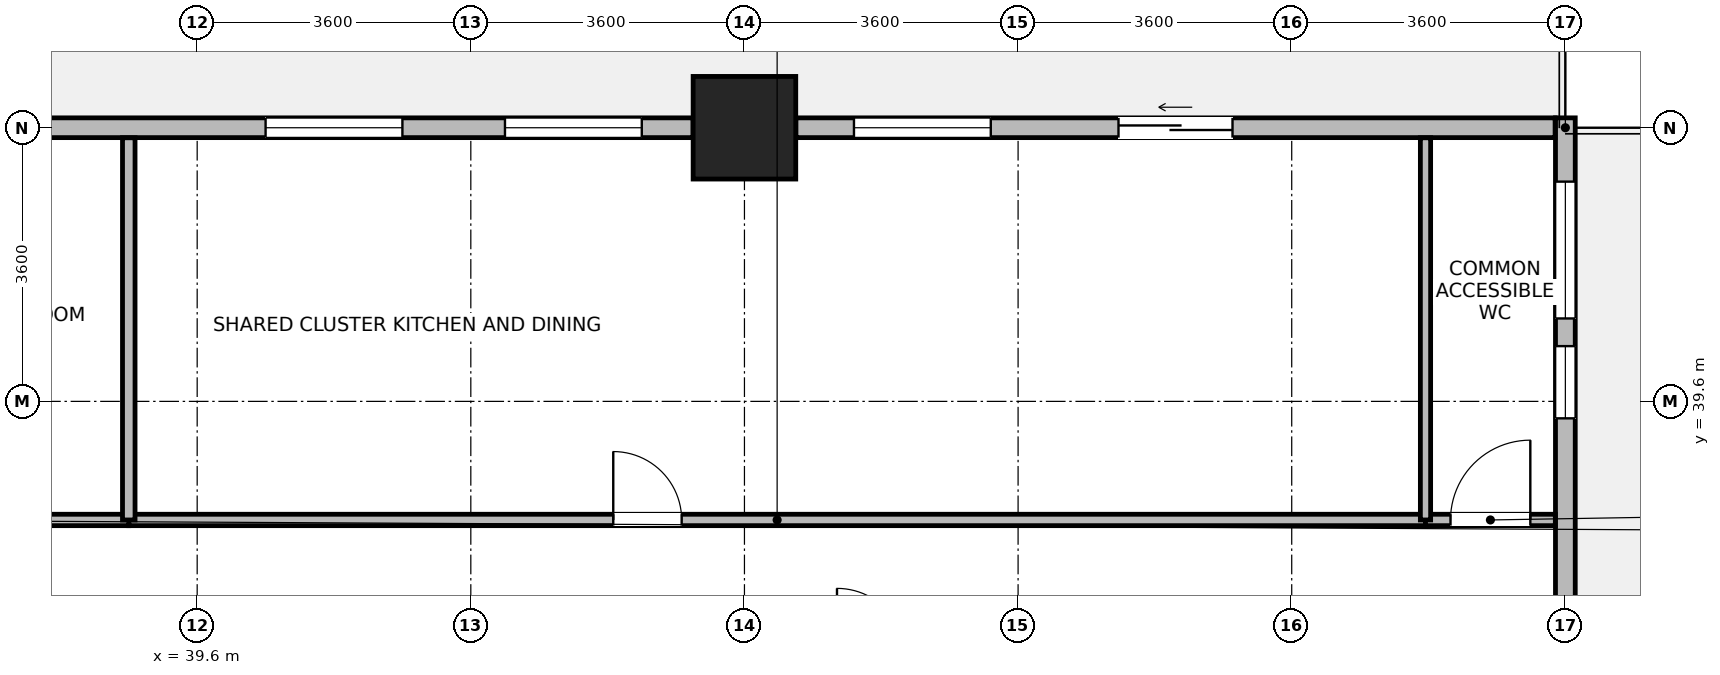
"""IFC4 building model, lengths in metres.
Left out: names, types, materials, properties, quantities, classifications, styles, units other than length and angle.
Written with IfcOpenShell. Run it as: python <this file> out.ifc"""

import sys

from ifc_helpers import new_model, si_unit, direction, frame, frame_2d, origin, origin_2d, place, context, subcontext, project, spatial, rectangle, extrude, source, transform, mapped, element, fill, save


model = new_model("IFC4")
c1 = context("Model", 3, precision=1e-05, world=origin(), true_north=direction((0.0, 1.0)))
c2 = subcontext(c1, "Body", "Model", "MODEL_VIEW")
j1 = project(units=[si_unit("LENGTHUNIT", "METRE"), si_unit("PLANEANGLEUNIT", "RADIAN")], contexts=[c1])
p1 = place(None, origin())
s1 = spatial("IfcSite", under=j1, at=p1, CompositionType="ELEMENT")
p2 = place(p1, origin())
s2 = spatial("IfcBuilding", under=s1, at=p2, CompositionType="ELEMENT")
p3 = place(p2, frame((0.0, 0.0, 32.7)))
s3 = spatial("IfcBuildingStorey", under=s2, at=p3, CompositionType="ELEMENT", Elevation=32.7)
m1 = source(origin(), c2, "Body", "SweptSolid", [
    extrude(rectangle(XDim=1.35, YDim=1.35, at=origin_2d()), origin(), (0.0, 0.0, 1.0), 3.7),
])
p4 = place(p3, frame((46.8, 43.2, 0.0), z_axis=(0.0, 0.0, 1.0), x_axis=(1.0, 0.0, 0.0)))
e1 = element("IfcColumn", 1, at=p4, inside=s3, PredefinedType="COLUMN", context=c2, shape_type="MappedRepresentation", body=[
    mapped(m1, transform((0.0, 0.0, 0.0), x_axis=(1.0, 0.0, 0.0), y_axis=(0.0, 1.0, 0.0), z_axis=(0.0, 0.0, 1.0), scale=1.0)),
])
p5 = place(p3, frame((57.6, 43.33, 0.0), z_axis=(0.0, 0.0, 1.0), x_axis=(0.0, -1.0, 0.0)))
e2 = element("IfcWall", 2, at=p5, inside=s3, PredefinedType="STANDARD", context=c2, shape_type="SweptSolid", body=[
    extrude(rectangle(XDim=6.956, YDim=0.26, at=frame_2d((3.478, 0.0))), origin(), (0.0, 0.0, 1.0), 3.43),
])
p6 = place(p5, frame((0.839, 0.0, 0.85)))
e3 = element("IfcOpeningElement", 3, at=p6, cuts=e2, PredefinedType="OPENING", context=c2, shape_type="SweptSolid", body=[
    extrude(rectangle(XDim=1.8, YDim=1.85, at=frame_2d((0.9, 0.925))), frame((0.0, 0.14, 0.0), z_axis=(0.0, -1.0, 0.0), x_axis=(1.0, 0.0, 0.0)), (0.0, 0.0, 1.0), 0.28),
])
p7 = place(p5, frame((3.003, 0.0, 0.85)))
e4 = element("IfcOpeningElement", 4, at=p7, cuts=e2, PredefinedType="OPENING", context=c2, shape_type="SweptSolid", body=[
    extrude(rectangle(XDim=0.95, YDim=1.75, at=frame_2d((0.475, 0.875))), frame((0.0, 0.14, 0.0), z_axis=(0.0, -1.0, 0.0), x_axis=(1.0, 0.0, 0.0)), (0.0, 0.0, 1.0), 0.28),
])
p8 = place(p3, frame((47.476, 43.2, 0.0), z_axis=(0.0, 0.0, 1.0), x_axis=(1.0, 0.0, 0.0)))
e5 = element("IfcWall", 5, at=p8, inside=s3, PredefinedType="STANDARD", context=c2, shape_type="SweptSolid", body=[
    extrude(rectangle(XDim=9.989, YDim=0.26, at=frame_2d((4.995, 0.0))), origin(), (0.0, 0.0, 1.0), 3.43),
])
p9 = place(p8, frame((4.245, 0.0, 0.0)))
e6 = element("IfcOpeningElement", 6, at=p9, cuts=e5, PredefinedType="OPENING", context=c2, shape_type="SweptSolid", body=[
    extrude(rectangle(XDim=1.5, YDim=2.15, at=frame_2d((0.75, 1.075))), frame((0.0, 0.14, 0.0), z_axis=(0.0, -1.0, 0.0), x_axis=(1.0, 0.0, 0.0)), (0.0, 0.0, 1.0), 0.28),
])
p10 = place(p8, frame((0.765, 0.0, 0.85)))
e7 = element("IfcOpeningElement", 7, at=p10, cuts=e5, PredefinedType="OPENING", context=c2, shape_type="SweptSolid", body=[
    extrude(rectangle(XDim=1.8, YDim=1.85, at=frame_2d((0.9, 0.925))), frame((0.0, 0.14, 0.0), z_axis=(0.0, -1.0, 0.0), x_axis=(1.0, 0.0, 0.0)), (0.0, 0.0, 1.0), 0.28),
])
p11 = place(p3, frame((36.676, 43.2, 0.0), z_axis=(0.0, 0.0, 1.0), x_axis=(1.0, 0.0, 0.0)))
e8 = element("IfcWall", 8, at=p11, inside=s3, PredefinedType="STANDARD", context=c2, shape_type="SweptSolid", body=[
    extrude(rectangle(XDim=9.448, YDim=0.26, at=frame_2d((4.724, 0.0))), origin(), (0.0, 0.0, 1.0), 2.93),
])
p12 = place(p11, frame((3.824, 0.0, 0.85)))
e9 = element("IfcOpeningElement", 9, at=p12, cuts=e8, PredefinedType="OPENING", context=c2, shape_type="SweptSolid", body=[
    extrude(rectangle(XDim=1.8, YDim=1.85, at=frame_2d((0.9, 0.925))), frame((0.0, 0.14, 0.0), z_axis=(0.0, -1.0, 0.0), x_axis=(1.0, 0.0, 0.0)), (0.0, 0.0, 1.0), 0.28),
])
p13 = place(p11, frame((6.973, 0.0, 0.85)))
e10 = element("IfcOpeningElement", 10, at=p13, cuts=e8, PredefinedType="OPENING", context=c2, shape_type="SweptSolid", body=[
    extrude(rectangle(XDim=1.8, YDim=1.85, at=frame_2d((0.9, 0.925))), frame((0.0, 0.14, 0.0), z_axis=(0.0, -1.0, 0.0), x_axis=(1.0, 0.0, 0.0)), (0.0, 0.0, 1.0), 0.28),
])
p14 = place(p3, frame((38.7, 38.04, 0.0), z_axis=(0.0, 0.0, 1.0), x_axis=(1.0, 0.0, 0.0)))
e11 = element("IfcWall", 11, at=p14, inside=s3, PredefinedType="PARTITIONING", context=c2, shape_type="SweptSolid", body=[
    extrude(rectangle(XDim=17.06, YDim=0.15, at=frame_2d((8.53, 0.0))), origin(), (0.0, 0.0, 1.0), 3.43),
])
p15 = place(p14, frame((6.374, 0.0, 0.0)))
e12 = element("IfcOpeningElement", 12, at=p15, cuts=e11, PredefinedType="OPENING", context=c2, shape_type="SweptSolid", body=[
    extrude(rectangle(XDim=0.9, YDim=2.08, at=frame_2d((0.45, 1.04))), frame((0.0, 0.085, 0.0), z_axis=(0.0, -1.0, 0.0), x_axis=(1.0, 0.0, 0.0)), (0.0, 0.0, 1.0), 0.17),
])
p16 = place(p3, frame((29.72, 38.04, 0.0), z_axis=(0.0, 0.0, 1.0), x_axis=(1.0, 0.0, 0.0)))
e13 = element("IfcWall", 13, at=p16, inside=s3, PredefinedType="PARTITIONING", context=c2, shape_type="SweptSolid", body=[
    extrude(rectangle(XDim=8.98, YDim=0.15, at=frame_2d((4.49, 0.0))), origin(), (0.0, 0.0, 1.0), 3.43),
])
p17 = place(p16, frame((4.015, 0.0, 0.0)))
e14 = element("IfcOpeningElement", 14, at=p17, cuts=e13, PredefinedType="OPENING", context=c2, shape_type="SweptSolid", body=[
    extrude(rectangle(XDim=0.95, YDim=2.1, at=frame_2d((0.475, 1.05))), frame((0.0, 0.085, 0.0), z_axis=(0.0, -1.0, 0.0), x_axis=(1.0, 0.0, 0.0)), (0.0, 0.0, 1.0), 0.17),
])
p18 = place(p3, frame((55.76, 38.04, 0.0), z_axis=(0.0, 0.0, 1.0), x_axis=(1.0, 0.0, 0.0)))
e15 = element("IfcWall", 15, at=p18, inside=s3, PredefinedType="PARTITIONING", context=c2, shape_type="SweptSolid", body=[
    extrude(rectangle(XDim=1.708, YDim=0.15, at=frame_2d((0.854, 0.0))), origin(), (0.0, 0.0, 1.0), 3.43),
])
p19 = place(p18, frame((0.329, 0.0, 0.0)))
e16 = element("IfcOpeningElement", 16, at=p19, cuts=e15, PredefinedType="OPENING", context=c2, shape_type="SweptSolid", body=[
    extrude(rectangle(XDim=1.05, YDim=2.12, at=frame_2d((0.525, 1.06))), frame((0.0, 0.085, 0.0), z_axis=(0.0, -1.0, 0.0), x_axis=(1.0, 0.0, 0.0)), (0.0, 0.0, 1.0), 0.17),
])
p20 = place(p3, frame((38.7, 38.04, 0.0), z_axis=(0.0, 0.0, 1.0), x_axis=(0.0, 1.0, 0.0)))
e17 = element("IfcWall", 17, at=p20, inside=s3, PredefinedType="PARTITIONING", context=c2, shape_type="SweptSolid", body=[
    extrude(rectangle(XDim=5.028, YDim=0.165, at=frame_2d((2.514, 0.0))), origin(), (0.0, 0.0, 1.0), 3.43),
])
p21 = place(p3, frame((55.76, 38.04, 0.0), z_axis=(0.0, 0.0, 1.0), x_axis=(0.0, 1.0, 0.0)))
e18 = element("IfcWall", 18, at=p21, inside=s3, PredefinedType="PARTITIONING", context=c2, shape_type="SweptSolid", body=[
    extrude(rectangle(XDim=5.028, YDim=0.135, at=frame_2d((2.514, 0.0))), origin(), (0.0, 0.0, 1.0), 3.43),
])
p22 = place(p6, origin())
e19 = element("IfcWindow", 19, at=p22, inside=s3, PartitioningType="SINGLE_PANEL", PredefinedType="WINDOW", context=c2, shape_type="SweptSolid", body=[
    extrude(rectangle(XDim=1.8, YDim=1.85, at=frame_2d((0.9, 0.925))), frame((0.0, 0.03, 0.0), z_axis=(0.0, -1.0, 0.0), x_axis=(1.0, 0.0, 0.0)), (0.0, 0.0, 1.0), 0.06),
])
fill(e3, e19)
p23 = place(p7, origin())
e20 = element("IfcWindow", 20, at=p23, inside=s3, PartitioningType="SINGLE_PANEL", PredefinedType="WINDOW", context=c2, shape_type="SweptSolid", body=[
    extrude(rectangle(XDim=0.95, YDim=1.75, at=frame_2d((0.475, 0.875))), frame((0.0, 0.03, 0.0), z_axis=(0.0, -1.0, 0.0), x_axis=(1.0, 0.0, 0.0)), (0.0, 0.0, 1.0), 0.06),
])
fill(e4, e20)
p24 = place(p9, origin())
e21 = element("IfcDoor", 21, at=p24, inside=s3, OperationType="SLIDING_TO_LEFT", PredefinedType="DOOR", context=c2, shape_type="SweptSolid", body=[
    extrude(rectangle(XDim=1.5, YDim=2.15, at=frame_2d((0.75, 1.075))), frame((0.0, 0.025, 0.0), z_axis=(0.0, -1.0, 0.0), x_axis=(1.0, 0.0, 0.0)), (0.0, 0.0, 1.0), 0.05),
])
fill(e6, e21)
p25 = place(p10, origin())
e22 = element("IfcWindow", 22, at=p25, inside=s3, PartitioningType="SINGLE_PANEL", PredefinedType="WINDOW", context=c2, shape_type="SweptSolid", body=[
    extrude(rectangle(XDim=1.8, YDim=1.85, at=frame_2d((0.9, 0.925))), frame((0.0, 0.03, 0.0), z_axis=(0.0, -1.0, 0.0), x_axis=(1.0, 0.0, 0.0)), (0.0, 0.0, 1.0), 0.06),
])
fill(e7, e22)
p26 = place(p12, origin())
e23 = element("IfcWindow", 23, at=p26, inside=s3, PartitioningType="SINGLE_PANEL", PredefinedType="WINDOW", context=c2, shape_type="SweptSolid", body=[
    extrude(rectangle(XDim=1.8, YDim=1.85, at=frame_2d((0.9, 0.925))), frame((0.0, 0.03, 0.0), z_axis=(0.0, -1.0, 0.0), x_axis=(1.0, 0.0, 0.0)), (0.0, 0.0, 1.0), 0.06),
])
fill(e9, e23)
p27 = place(p13, origin())
e24 = element("IfcWindow", 24, at=p27, inside=s3, PartitioningType="SINGLE_PANEL", PredefinedType="WINDOW", context=c2, shape_type="SweptSolid", body=[
    extrude(rectangle(XDim=1.8, YDim=1.85, at=frame_2d((0.9, 0.925))), frame((0.0, 0.03, 0.0), z_axis=(0.0, -1.0, 0.0), x_axis=(1.0, 0.0, 0.0)), (0.0, 0.0, 1.0), 0.06),
])
fill(e10, e24)
p28 = place(p15, origin())
e25 = element("IfcDoor", 25, at=p28, inside=s3, OperationType="SINGLE_SWING_LEFT", PredefinedType="DOOR", context=c2, shape_type="SweptSolid", body=[
    extrude(rectangle(XDim=0.9, YDim=2.08, at=frame_2d((0.45, 1.04))), frame((0.0, 0.025, 0.0), z_axis=(0.0, -1.0, 0.0), x_axis=(1.0, 0.0, 0.0)), (0.0, 0.0, 1.0), 0.05),
])
fill(e12, e25)
p29 = place(p19, origin())
e26 = element("IfcDoor", 26, at=p29, inside=s3, OperationType="SINGLE_SWING_RIGHT", PredefinedType="DOOR", context=c2, shape_type="SweptSolid", body=[
    extrude(rectangle(XDim=1.05, YDim=2.12, at=frame_2d((0.525, 1.06))), frame((0.0, 0.025, 0.0), z_axis=(0.0, -1.0, 0.0), x_axis=(1.0, 0.0, 0.0)), (0.0, 0.0, 1.0), 0.05),
])
fill(e16, e26)
save(model, sys.argv[1])
